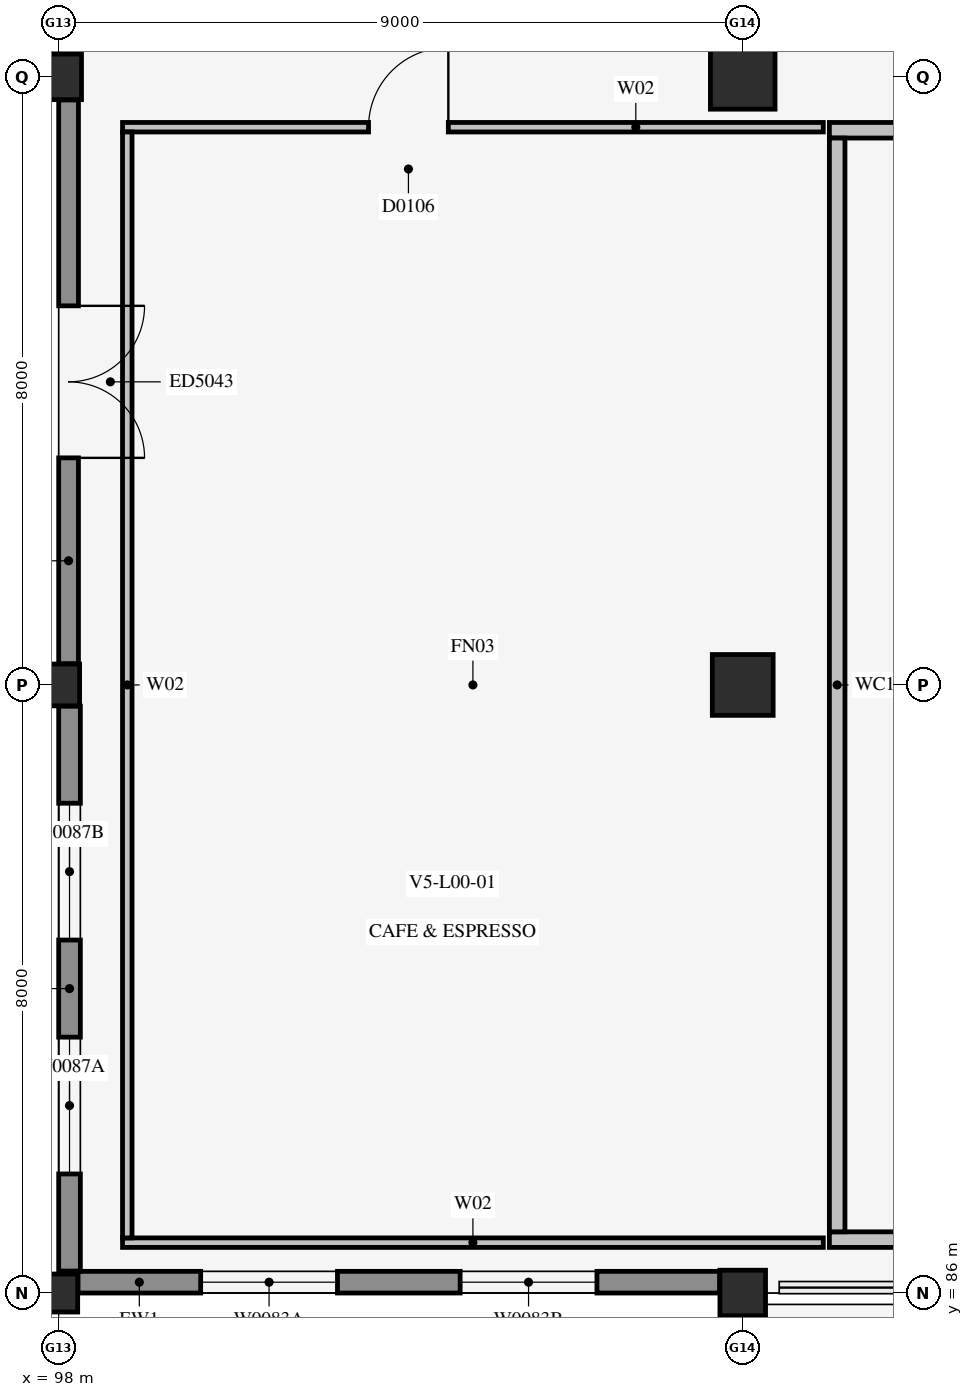
"""IFC4 building model, lengths in metres.
Left out: names, types, materials, properties, quantities, classifications, styles, units other than length and angle.
Written with IfcOpenShell. Run it as: python <this file> out.ifc"""

import sys

from ifc_helpers import new_model, si_unit, direction, frame, frame_2d, origin, origin_2d, place, context, subcontext, project, spatial, rectangle, extrude, element, fill, save


model = new_model("IFC4")
c1 = context("Model", 3, precision=1e-05, world=origin(), true_north=direction((0.0, 1.0)))
c2 = subcontext(c1, "Body", "Model", "MODEL_VIEW")
j1 = project(units=[si_unit("LENGTHUNIT", "METRE"), si_unit("PLANEANGLEUNIT", "RADIAN")], contexts=[c1])
p1 = place(None, origin())
s1 = spatial("IfcSite", under=j1, at=p1, CompositionType="ELEMENT")
p2 = place(p1, origin())
s2 = spatial("IfcBuilding", under=s1, at=p2, CompositionType="ELEMENT")
p3 = place(p2, origin())
s3 = spatial("IfcBuildingStorey", under=s2, at=p3, CompositionType="ELEMENT", Elevation=0.0)
p4 = place(p3, frame((98.0, 86.0, 0.0), z_axis=(0.0, 0.0, 1.0), x_axis=(1.0, 0.0, 0.0)))
e1 = element("IfcColumn", 1, at=p4, inside=s3, PredefinedType="COLUMN", context=c2, shape_type="SweptSolid", body=[
    extrude(rectangle(XDim=0.5, YDim=0.5, at=origin_2d()), origin(), (0.0, 0.0, 1.0), 5.4),
])
p5 = place(p3, frame((98.0, 94.0, 0.0), z_axis=(0.0, 0.0, 1.0), x_axis=(1.0, 0.0, 0.0)))
e2 = element("IfcColumn", 2, at=p5, inside=s3, PredefinedType="COLUMN", context=c2, shape_type="SweptSolid", body=[
    extrude(rectangle(XDim=0.55, YDim=0.55, at=origin_2d()), origin(), (0.0, 0.0, 1.0), 5.4),
])
for number, where, z_axis, x_axis in (
    (3, (98.0, 102.0, 0.0), (0.0, 0.0, 1.0), (1.0, 0.0, 0.0)),
    (4, (107.0, 86.0, 0.0), (0.0, 0.0, 1.0), (1.0, 0.0, 0.0)),
):
    element("IfcColumn", number, at=place(p3, frame(where, z_axis=z_axis, x_axis=x_axis)), inside=s3, PredefinedType="COLUMN", context=c2, shape_type="SweptSolid", body=[
        extrude(rectangle(XDim=0.6, YDim=0.6, at=origin_2d()), origin(), (0.0, 0.0, 1.0), 5.4),
    ])
p6 = place(p3, frame((107.0, 94.0, 0.0), z_axis=(0.0, 0.0, 1.0), x_axis=(1.0, 0.0, 0.0)))
e5 = element("IfcColumn", 5, at=p6, inside=s3, PredefinedType="COLUMN", context=c2, shape_type="SweptSolid", body=[
    extrude(rectangle(XDim=0.8, YDim=0.8, at=origin_2d()), origin(), (0.0, 0.0, 1.0), 5.4),
])
p7 = place(p3, frame((107.0, 102.0, 0.0), z_axis=(0.0, 0.0, 1.0), x_axis=(1.0, 0.0, 0.0)))
e6 = element("IfcColumn", 6, at=p7, inside=s3, PredefinedType="COLUMN", context=c2, shape_type="SweptSolid", body=[
    extrude(rectangle(XDim=0.85, YDim=0.85, at=origin_2d()), origin(), (0.0, 0.0, 1.0), 5.4),
])
p8 = place(p3, frame((98.84, 86.663, 0.0), z_axis=(0.0, 0.0, 1.0), x_axis=(1.0, 0.0, 0.0)))
e7 = element("IfcWall", 7, at=p8, inside=s3, PredefinedType="PARTITIONING", context=c2, shape_type="SweptSolid", body=[
    extrude(rectangle(XDim=9.22, YDim=0.125, at=frame_2d((4.61, 0.0))), origin(), (0.0, 0.0, 1.0), 5.125),
])
p9 = place(p3, frame((98.84, 101.337, 0.0), z_axis=(0.0, 0.0, 1.0), x_axis=(1.0, 0.0, 0.0)))
e8 = element("IfcWall", 8, at=p9, inside=s3, PredefinedType="PARTITIONING", context=c2, shape_type="SweptSolid", body=[
    extrude(rectangle(XDim=9.22, YDim=0.125, at=frame_2d((4.61, 0.0))), origin(), (0.0, 0.0, 1.0), 5.125),
])
p10 = place(p9, frame((3.237, 0.0, 0.0)))
e9 = element("IfcOpeningElement", 9, at=p10, cuts=e8, PredefinedType="OPENING", context=c2, shape_type="SweptSolid", body=[
    extrude(rectangle(XDim=1.05, YDim=2.15, at=frame_2d((0.525, 1.075))), frame((0.0, 0.074, 0.0), z_axis=(0.0, -1.0, 0.0), x_axis=(1.0, 0.0, 0.0)), (0.0, 0.0, 1.0), 0.149),
])
p11 = place(p3, frame((98.903, 86.725, 0.0), z_axis=(0.0, 0.0, 1.0), x_axis=(0.0, 1.0, 0.0)))
e10 = element("IfcWall", 10, at=p11, inside=s3, PredefinedType="PARTITIONING", context=c2, shape_type="SweptSolid", body=[
    extrude(rectangle(XDim=14.55, YDim=0.125, at=frame_2d((7.275, 0.0))), origin(), (0.0, 0.0, 1.0), 5.125),
])
p12 = place(p3, frame((108.14, 86.702, 0.0), z_axis=(0.0, 0.0, 1.0), x_axis=(1.0, 0.0, 0.0)))
e11 = element("IfcWall", 11, at=p12, inside=s3, PredefinedType="SOLIDWALL", context=c2, shape_type="SweptSolid", body=[
    extrude(rectangle(XDim=9.22, YDim=0.205, at=frame_2d((4.61, 0.0))), origin(), (0.0, 0.0, 1.0), 5.125),
])
p13 = place(p3, frame((108.14, 101.298, 0.0), z_axis=(0.0, 0.0, 1.0), x_axis=(1.0, 0.0, 0.0)))
e12 = element("IfcWall", 12, at=p13, inside=s3, PredefinedType="SOLIDWALL", context=c2, shape_type="SweptSolid", body=[
    extrude(rectangle(XDim=9.22, YDim=0.205, at=frame_2d((4.61, 0.0))), origin(), (0.0, 0.0, 1.0), 5.125),
])
p14 = place(p13, frame((3.256, 0.0, 0.0)))
e13 = element("IfcOpeningElement", 13, at=p14, cuts=e12, PredefinedType="OPENING", context=c2, shape_type="SweptSolid", body=[
    extrude(rectangle(XDim=1.0, YDim=2.2, at=frame_2d((0.5, 1.1))), frame((0.0, 0.115, 0.0), z_axis=(0.0, -1.0, 0.0), x_axis=(1.0, 0.0, 0.0)), (0.0, 0.0, 1.0), 0.229),
])
p15 = place(p3, frame((108.242, 86.805, 0.0), z_axis=(0.0, 0.0, 1.0), x_axis=(0.0, 1.0, 0.0)))
e14 = element("IfcWall", 14, at=p15, inside=s3, PredefinedType="SOLIDWALL", context=c2, shape_type="SweptSolid", body=[
    extrude(rectangle(XDim=14.39, YDim=0.205, at=frame_2d((7.195, 0.0))), origin(), (0.0, 0.0, 1.0), 5.125),
])
p16 = place(p3, frame((98.254, 86.143, 0.0), z_axis=(0.0, 0.0, 1.0), x_axis=(1.0, 0.0, 0.0)))
e15 = element("IfcWall", 15, at=p16, inside=s3, PredefinedType="SOLIDWALL", context=c2, shape_type="SweptSolid", body=[
    extrude(rectangle(XDim=8.442, YDim=0.285, at=frame_2d((4.221, 0.0))), origin(), (0.0, 0.0, 1.0), 4.65),
])
p17 = place(p16, frame((1.614, 0.0, 0.95)))
e16 = element("IfcOpeningElement", 16, at=p17, cuts=e15, PredefinedType="OPENING", context=c2, shape_type="SweptSolid", body=[
    extrude(rectangle(XDim=1.8, YDim=1.5, at=frame_2d((0.9, 0.75))), frame((0.0, 0.154, 0.0), z_axis=(0.0, -1.0, 0.0), x_axis=(1.0, 0.0, 0.0)), (0.0, 0.0, 1.0), 0.309),
])
p18 = place(p16, frame((5.028, 0.0, 0.95)))
e17 = element("IfcOpeningElement", 17, at=p18, cuts=e15, PredefinedType="OPENING", context=c2, shape_type="SweptSolid", body=[
    extrude(rectangle(XDim=1.8, YDim=1.5, at=frame_2d((0.9, 0.75))), frame((0.0, 0.154, 0.0), z_axis=(0.0, -1.0, 0.0), x_axis=(1.0, 0.0, 0.0)), (0.0, 0.0, 1.0), 0.309),
])
p19 = place(p3, frame((98.143, 86.289, 0.0), z_axis=(0.0, 0.0, 1.0), x_axis=(0.0, 1.0, 0.0)))
e18 = element("IfcWall", 18, at=p19, inside=s3, PredefinedType="SOLIDWALL", context=c2, shape_type="SweptSolid", body=[
    extrude(rectangle(XDim=7.432, YDim=0.285, at=frame_2d((3.716, 0.0))), origin(), (0.0, 0.0, 1.0), 4.574),
])
p20 = place(p19, frame((1.277, 0.0, 0.95)))
e19 = element("IfcOpeningElement", 19, at=p20, cuts=e18, PredefinedType="OPENING", context=c2, shape_type="SweptSolid", body=[
    extrude(rectangle(XDim=1.8, YDim=1.8, at=frame_2d((0.9, 0.9))), frame((0.0, 0.154, 0.0), z_axis=(0.0, -1.0, 0.0), x_axis=(1.0, 0.0, 0.0)), (0.0, 0.0, 1.0), 0.309),
])
p21 = place(p19, frame((4.355, 0.0, 0.95)))
e20 = element("IfcOpeningElement", 20, at=p21, cuts=e18, PredefinedType="OPENING", context=c2, shape_type="SweptSolid", body=[
    extrude(rectangle(XDim=1.8, YDim=1.8, at=frame_2d((0.9, 0.9))), frame((0.0, 0.154, 0.0), z_axis=(0.0, -1.0, 0.0), x_axis=(1.0, 0.0, 0.0)), (0.0, 0.0, 1.0), 0.309),
])
p22 = place(p3, frame((98.13, 94.279, 0.0), z_axis=(0.0, 0.0, 1.0), x_axis=(0.0, 1.0, 0.0)))
e21 = element("IfcWall", 21, at=p22, inside=s3, PredefinedType="SOLIDWALL", context=c2, shape_type="SweptSolid", body=[
    extrude(rectangle(XDim=7.417, YDim=0.26, at=frame_2d((3.708, 0.0))), origin(), (0.0, 0.0, 1.0), 4.498),
])
p23 = place(p22, frame((2.708, 0.0, 0.0)))
e22 = element("IfcOpeningElement", 22, at=p23, cuts=e21, PredefinedType="OPENING", context=c2, shape_type="SweptSolid", body=[
    extrude(rectangle(XDim=2.0, YDim=2.4, at=frame_2d((1.0, 1.2))), frame((0.0, 0.142, 0.0), z_axis=(0.0, -1.0, 0.0), x_axis=(1.0, 0.0, 0.0)), (0.0, 0.0, 1.0), 0.284),
])
p24 = place(p10, frame((1.05, 0.0, 0.0), z_axis=(0.0, 0.0, 1.0), x_axis=(-1.0, 0.0, 0.0)))
e23 = element("IfcDoor", 23, at=p24, inside=s3, OperationType="SINGLE_SWING_RIGHT", PredefinedType="DOOR", context=c2, shape_type="SweptSolid", body=[
    extrude(rectangle(XDim=1.05, YDim=2.15, at=frame_2d((0.525, 1.075))), frame((0.0, 0.025, 0.0), z_axis=(0.0, -1.0, 0.0), x_axis=(1.0, 0.0, 0.0)), (0.0, 0.0, 1.0), 0.05),
])
fill(e9, e23)
p25 = place(p17, origin())
e24 = element("IfcWindow", 24, at=p25, inside=s3, PartitioningType="SINGLE_PANEL", PredefinedType="WINDOW", context=c2, shape_type="SweptSolid", body=[
    extrude(rectangle(XDim=1.8, YDim=1.5, at=frame_2d((0.9, 0.75))), frame((0.0, 0.03, 0.0), z_axis=(0.0, -1.0, 0.0), x_axis=(1.0, 0.0, 0.0)), (0.0, 0.0, 1.0), 0.06),
])
fill(e16, e24)
p26 = place(p18, origin())
e25 = element("IfcWindow", 25, at=p26, inside=s3, PartitioningType="SINGLE_PANEL", PredefinedType="WINDOW", context=c2, shape_type="SweptSolid", body=[
    extrude(rectangle(XDim=1.8, YDim=1.5, at=frame_2d((0.9, 0.75))), frame((0.0, 0.03, 0.0), z_axis=(0.0, -1.0, 0.0), x_axis=(1.0, 0.0, 0.0)), (0.0, 0.0, 1.0), 0.06),
])
fill(e17, e25)
p27 = place(p20, origin())
e26 = element("IfcWindow", 26, at=p27, inside=s3, PartitioningType="SINGLE_PANEL", PredefinedType="WINDOW", context=c2, shape_type="SweptSolid", body=[
    extrude(rectangle(XDim=1.8, YDim=1.8, at=frame_2d((0.9, 0.9))), frame((0.0, 0.03, 0.0), z_axis=(0.0, -1.0, 0.0), x_axis=(1.0, 0.0, 0.0)), (0.0, 0.0, 1.0), 0.06),
])
fill(e19, e26)
p28 = place(p21, origin())
e27 = element("IfcWindow", 27, at=p28, inside=s3, PartitioningType="SINGLE_PANEL", PredefinedType="WINDOW", context=c2, shape_type="SweptSolid", body=[
    extrude(rectangle(XDim=1.8, YDim=1.8, at=frame_2d((0.9, 0.9))), frame((0.0, 0.03, 0.0), z_axis=(0.0, -1.0, 0.0), x_axis=(1.0, 0.0, 0.0)), (0.0, 0.0, 1.0), 0.06),
])
fill(e20, e27)
p29 = place(p23, origin())
e28 = element("IfcDoor", 28, at=p29, inside=s3, OperationType="DOUBLE_DOOR_SINGLE_SWING", PredefinedType="DOOR", context=c2, shape_type="SweptSolid", body=[
    extrude(rectangle(XDim=2.0, YDim=2.4, at=frame_2d((1.0, 1.2))), frame((0.0, 0.025, 0.0), z_axis=(0.0, -1.0, 0.0), x_axis=(1.0, 0.0, 0.0)), (0.0, 0.0, 1.0), 0.05),
])
fill(e22, e28)
save(model, sys.argv[1])
